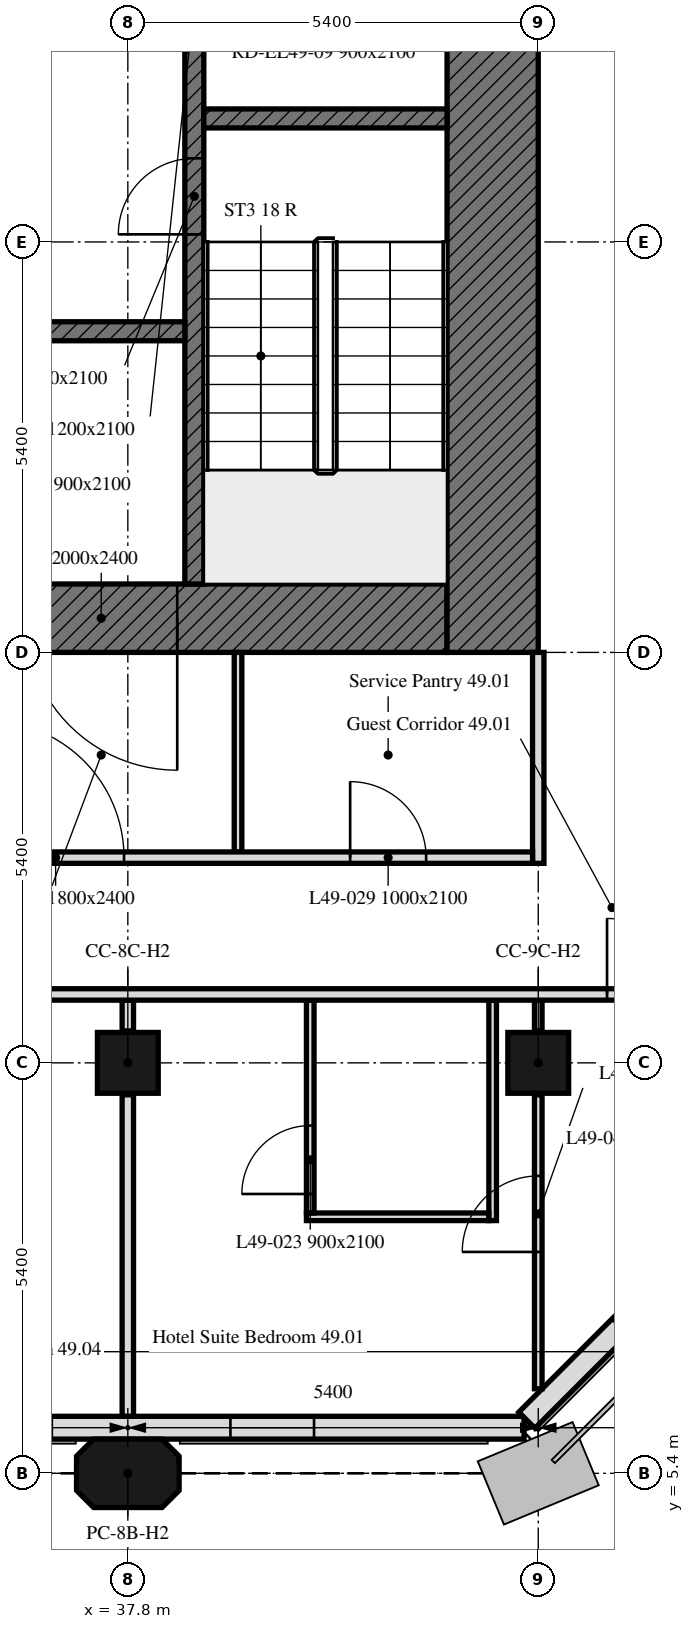
"""IFC4 building model, lengths in metres.
Left out: names, types, materials, properties, quantities, classifications, styles, units other than length and angle.
Written with IfcOpenShell. Run it as: python <this file> out.ifc"""

import sys

from ifc_helpers import new_model, si_unit, direction, frame, frame_2d, origin, origin_2d, place, context, subcontext, project, spatial, polyline, rectangle, outline, extrude, element, fill, save


model = new_model("IFC4")
c1 = context("Model", 3, precision=1e-05, world=origin(), true_north=direction((0.0, 1.0)))
c2 = subcontext(c1, "Body", "Model", "MODEL_VIEW")
j1 = project(units=[si_unit("LENGTHUNIT", "METRE"), si_unit("PLANEANGLEUNIT", "RADIAN")], contexts=[c1])
p1 = place(None, origin())
s1 = spatial("IfcSite", under=j1, at=p1, CompositionType="ELEMENT")
p2 = place(p1, origin())
s2 = spatial("IfcBuilding", under=s1, at=p2, CompositionType="ELEMENT")
p3 = place(p2, frame((0.0, 0.0, 200.5)))
s3 = spatial("IfcBuildingStorey", under=s2, at=p3, CompositionType="ELEMENT", Elevation=200.5)
p4 = place(p3, frame((37.8, 5.4, 0.0), z_axis=(0.0, 0.0, 1.0), x_axis=(1.0, 0.0, 0.0)))
e1 = element("IfcColumn", 1, at=p4, inside=s3, PredefinedType="COLUMN", context=c2, shape_type="SweptSolid", body=[
    extrude(outline(polyline([(-0.45, -0.45), (0.45, -0.45), (0.675, -0.225), (0.675, 0.225), (0.45, 0.45), (-0.45, 0.45), (-0.675, 0.225), (-0.675, -0.225), (-0.45, -0.45)])), origin(), (0.0, 0.0, 1.0), 3.0),
])
for number, where, z_axis, x_axis in (
    (2, (37.8, 10.8, 0.0), (0.0, 0.0, 1.0), (1.0, 0.0, 0.0)),
    (3, (43.2, 10.8, 0.0), (0.0, 0.0, 1.0), (1.0, 0.0, 0.0)),
):
    element("IfcColumn", number, at=place(p3, frame(where, z_axis=z_axis, x_axis=x_axis)), inside=s3, PredefinedType="COLUMN", context=c2, shape_type="SweptSolid", body=[
        extrude(rectangle(XDim=0.8, YDim=0.8, at=origin_2d()), origin(), (0.0, 0.0, 1.0), 3.0),
    ])
p5 = place(p3, frame((10.986, 6.0, 0.0), z_axis=(0.0, 0.0, 1.0), x_axis=(1.0, 0.0, 0.0)))
e4 = element("IfcWall", 4, at=p5, inside=s3, PredefinedType="SOLIDWALL", context=c2, shape_type="SweptSolid", body=[
    extrude(rectangle(XDim=32.027, YDim=0.3, at=frame_2d((16.014, 0.0))), origin(), (0.0, 0.0, 1.0), 3.0),
])
p6 = place(p5, frame((0.814, 0.0, 0.9)))
e5 = element("IfcOpeningElement", 5, at=p6, cuts=e4, PredefinedType="OPENING", context=c2, shape_type="SweptSolid", body=[
    extrude(rectangle(XDim=3.4, YDim=1.7, at=frame_2d((1.7, 0.85))), frame((0.0, 0.16, 0.0), z_axis=(0.0, -1.0, 0.0), x_axis=(1.0, 0.0, 0.0)), (0.0, 0.0, 1.0), 0.32),
])
p7 = place(p5, frame((6.564, 0.0, 0.9)))
e6 = element("IfcOpeningElement", 6, at=p7, cuts=e4, PredefinedType="OPENING", context=c2, shape_type="SweptSolid", body=[
    extrude(rectangle(XDim=1.1, YDim=1.7, at=frame_2d((0.55, 0.85))), frame((0.0, 0.16, 0.0), z_axis=(0.0, -1.0, 0.0), x_axis=(1.0, 0.0, 0.0)), (0.0, 0.0, 1.0), 0.32),
])
p8 = place(p5, frame((11.614, 0.0, 0.9)))
e7 = element("IfcOpeningElement", 7, at=p8, cuts=e4, PredefinedType="OPENING", context=c2, shape_type="SweptSolid", body=[
    extrude(rectangle(XDim=3.4, YDim=1.7, at=frame_2d((1.7, 0.85))), frame((0.0, 0.16, 0.0), z_axis=(0.0, -1.0, 0.0), x_axis=(1.0, 0.0, 0.0)), (0.0, 0.0, 1.0), 0.32),
])
p9 = place(p5, frame((17.364, 0.0, 0.9)))
e8 = element("IfcOpeningElement", 8, at=p9, cuts=e4, PredefinedType="OPENING", context=c2, shape_type="SweptSolid", body=[
    extrude(rectangle(XDim=1.1, YDim=1.7, at=frame_2d((0.55, 0.85))), frame((0.0, 0.16, 0.0), z_axis=(0.0, -1.0, 0.0), x_axis=(1.0, 0.0, 0.0)), (0.0, 0.0, 1.0), 0.32),
])
p10 = place(p5, frame((22.414, 0.0, 0.9)))
e9 = element("IfcOpeningElement", 9, at=p10, cuts=e4, PredefinedType="OPENING", context=c2, shape_type="SweptSolid", body=[
    extrude(rectangle(XDim=3.4, YDim=1.7, at=frame_2d((1.7, 0.85))), frame((0.0, 0.16, 0.0), z_axis=(0.0, -1.0, 0.0), x_axis=(1.0, 0.0, 0.0)), (0.0, 0.0, 1.0), 0.32),
])
p11 = place(p5, frame((28.164, 0.0, 0.9)))
e10 = element("IfcOpeningElement", 10, at=p11, cuts=e4, PredefinedType="OPENING", context=c2, shape_type="SweptSolid", body=[
    extrude(rectangle(XDim=1.1, YDim=1.7, at=frame_2d((0.55, 0.85))), frame((0.0, 0.16, 0.0), z_axis=(0.0, -1.0, 0.0), x_axis=(1.0, 0.0, 0.0)), (0.0, 0.0, 1.0), 0.32),
])
p12 = place(p3, frame((43.051, 6.099, 0.0), z_axis=(0.0, 0.0, 1.0), x_axis=(0.707106781187, 0.707106781187, 0.0)))
e11 = element("IfcWall", 11, at=p12, inside=s3, PredefinedType="SOLIDWALL", context=c2, shape_type="SweptSolid", body=[
    extrude(rectangle(XDim=6.86, YDim=0.3, at=frame_2d((3.43, 0.0))), origin(), (0.0, 0.0, 1.0), 3.0),
])
p13 = place(p12, frame((1.73, 0.0, 0.9)))
e12 = element("IfcOpeningElement", 12, at=p13, cuts=e11, PredefinedType="OPENING", context=c2, shape_type="SweptSolid", body=[
    extrude(rectangle(XDim=3.4, YDim=1.7, at=frame_2d((1.7, 0.85))), frame((0.0, 0.16, 0.0), z_axis=(0.0, -1.0, 0.0), x_axis=(1.0, 0.0, 0.0)), (0.0, 0.0, 1.0), 0.32),
])
p14 = place(p3, frame((42.0, 16.65, 0.0), z_axis=(0.0, 0.0, 1.0), x_axis=(-1.0, 0.0, 0.0)))
e13 = element("IfcWall", 13, at=p14, inside=s3, PredefinedType="SOLIDWALL", context=c2, shape_type="SweptSolid", body=[
    extrude(rectangle(XDim=11.1, YDim=0.9, at=frame_2d((5.55, 0.0))), origin(), (0.0, 0.0, 1.0), 3.0),
])
p15 = place(p14, frame((3.55, 0.0, 0.0)))
e14 = element("IfcOpeningElement", 14, at=p15, cuts=e13, PredefinedType="OPENING", context=c2, shape_type="SweptSolid", body=[
    extrude(rectangle(XDim=2.0, YDim=2.4, at=frame_2d((1.0, 1.2))), frame((0.0, 0.45, 0.0), z_axis=(0.0, -1.0, 0.0), x_axis=(1.0, 0.0, 0.0)), (0.0, 0.0, 1.0), 0.9),
])
p16 = place(p3, frame((42.6, 32.4, 0.0), z_axis=(0.0, 0.0, 1.0), x_axis=(0.0, -1.0, 0.0)))
e15 = element("IfcWall", 15, at=p16, inside=s3, PredefinedType="SOLIDWALL", context=c2, shape_type="SweptSolid", body=[
    extrude(rectangle(XDim=16.2, YDim=1.2, at=frame_2d((8.1, 0.0))), origin(), (0.0, 0.0, 1.0), 3.0),
])
p17 = place(p3, frame((38.675, 17.1, 0.0), z_axis=(0.0, 0.0, 1.0), x_axis=(0.0, 1.0, 0.0)))
e16 = element("IfcWall", 16, at=p17, inside=s3, PredefinedType="SOLIDWALL", context=c2, shape_type="SweptSolid", body=[
    extrude(rectangle(XDim=14.4, YDim=0.25, at=frame_2d((7.2, 0.0))), origin(), (0.0, 0.0, 1.0), 3.0),
])
p18 = place(p17, frame((4.6, 0.0, 0.0)))
e17 = element("IfcOpeningElement", 17, at=p18, cuts=e16, PredefinedType="OPENING", context=c2, shape_type="SweptSolid", body=[
    extrude(rectangle(XDim=1.0, YDim=2.1, at=frame_2d((0.5, 1.05))), frame((0.0, 0.125, 0.0), z_axis=(0.0, -1.0, 0.0), x_axis=(1.0, 0.0, 0.0)), (0.0, 0.0, 1.0), 0.25),
])
p19 = place(p17, frame((7.062, 0.0, 0.0)))
e18 = element("IfcOpeningElement", 18, at=p19, cuts=e16, PredefinedType="OPENING", context=c2, shape_type="SweptSolid", body=[
    extrude(rectangle(XDim=1.2, YDim=2.1, at=frame_2d((0.6, 1.05))), frame((0.0, 0.125, 0.0), z_axis=(0.0, -1.0, 0.0), x_axis=(1.0, 0.0, 0.0)), (0.0, 0.0, 1.0), 0.25),
])
p20 = place(p17, frame((9.472, 0.0, 0.0)))
e19 = element("IfcOpeningElement", 19, at=p20, cuts=e16, PredefinedType="OPENING", context=c2, shape_type="SweptSolid", body=[
    extrude(rectangle(XDim=0.9, YDim=2.1, at=frame_2d((0.45, 1.05))), frame((0.0, 0.125, 0.0), z_axis=(0.0, -1.0, 0.0), x_axis=(1.0, 0.0, 0.0)), (0.0, 0.0, 1.0), 0.25),
])
p21 = place(p17, frame((11.159, 0.0, 0.0)))
e20 = element("IfcOpeningElement", 20, at=p21, cuts=e16, PredefinedType="OPENING", context=c2, shape_type="SweptSolid", body=[
    extrude(rectangle(XDim=0.9, YDim=2.1, at=frame_2d((0.45, 1.05))), frame((0.0, 0.125, 0.0), z_axis=(0.0, -1.0, 0.0), x_axis=(1.0, 0.0, 0.0)), (0.0, 0.0, 1.0), 0.25),
])
p22 = place(p17, frame((13.1, 0.0, 0.0)))
e21 = element("IfcOpeningElement", 21, at=p22, cuts=e16, PredefinedType="OPENING", context=c2, shape_type="SweptSolid", body=[
    extrude(rectangle(XDim=0.9, YDim=2.1, at=frame_2d((0.45, 1.05))), frame((0.0, 0.125, 0.0), z_axis=(0.0, -1.0, 0.0), x_axis=(1.0, 0.0, 0.0)), (0.0, 0.0, 1.0), 0.25),
])
p23 = place(p3, frame((38.8, 23.225, 0.0), z_axis=(0.0, 0.0, 1.0), x_axis=(1.0, 0.0, 0.0)))
e22 = element("IfcWall", 22, at=p23, inside=s3, PredefinedType="SOLIDWALL", context=c2, shape_type="SweptSolid", body=[
    extrude(rectangle(XDim=3.2, YDim=0.25, at=frame_2d((1.6, 0.0))), origin(), (0.0, 0.0, 1.0), 3.0),
])
p24 = place(p3, frame((35.8, 20.425, 0.0), z_axis=(0.0, 0.0, 1.0), x_axis=(1.0, 0.0, 0.0)))
e23 = element("IfcWall", 23, at=p24, inside=s3, PredefinedType="SOLIDWALL", context=c2, shape_type="SweptSolid", body=[
    extrude(rectangle(XDim=2.75, YDim=0.25, at=frame_2d((1.375, 0.0))), origin(), (0.0, 0.0, 1.0), 3.0),
])
p25 = place(p3, frame((37.8, 6.151, 0.0), z_axis=(0.0, 0.0, 1.0), x_axis=(0.0, 1.0, 0.0)))
e24 = element("IfcWall", 24, at=p25, inside=s3, PredefinedType="PARTITIONING", context=c2, shape_type="SweptSolid", body=[
    extrude(rectangle(XDim=4.229, YDim=0.15, at=frame_2d((2.115, 0.0))), origin(), (0.0, 0.0, 1.0), 3.0),
])
p26 = place(p3, frame((37.8, 11.22, 0.0), z_axis=(0.0, 0.0, 1.0), x_axis=(0.0, 1.0, 0.0)))
e25 = element("IfcWall", 25, at=p26, inside=s3, PredefinedType="PARTITIONING", context=c2, shape_type="SweptSolid", body=[
    extrude(rectangle(XDim=0.405, YDim=0.15, at=frame_2d((0.203, 0.0))), origin(), (0.0, 0.0, 1.0), 3.0),
])
p27 = place(p3, frame((43.2, 6.512, 0.0), z_axis=(0.0, 0.0, 1.0), x_axis=(0.0, 1.0, 0.0)))
e26 = element("IfcWall", 26, at=p27, inside=s3, PredefinedType="PARTITIONING", context=c2, shape_type="SweptSolid", body=[
    extrude(rectangle(XDim=3.868, YDim=0.1, at=frame_2d((1.934, 0.0))), origin(), (0.0, 0.0, 1.0), 3.0),
])
p28 = place(p27, frame((1.8, 0.0, 0.0)))
e27 = element("IfcOpeningElement", 27, at=p28, cuts=e26, PredefinedType="OPENING", context=c2, shape_type="SweptSolid", body=[
    extrude(rectangle(XDim=1.0, YDim=2.1, at=frame_2d((0.5, 1.05))), frame((0.0, 0.05, 0.0), z_axis=(0.0, -1.0, 0.0), x_axis=(1.0, 0.0, 0.0)), (0.0, 0.0, 1.0), 0.1),
])
p29 = place(p3, frame((43.2, 11.22, 0.0), z_axis=(0.0, 0.0, 1.0), x_axis=(0.0, 1.0, 0.0)))
e28 = element("IfcWall", 28, at=p29, inside=s3, PredefinedType="PARTITIONING", context=c2, shape_type="SweptSolid", body=[
    extrude(rectangle(XDim=0.405, YDim=0.1, at=frame_2d((0.203, 0.0))), origin(), (0.0, 0.0, 1.0), 3.0),
])
p30 = place(p3, frame((42.6, 11.625, 0.0), z_axis=(0.0, 0.0, 1.0), x_axis=(0.0, -1.0, 0.0)))
e29 = element("IfcWall", 29, at=p30, inside=s3, PredefinedType="PARTITIONING", context=c2, shape_type="SweptSolid", body=[
    extrude(rectangle(XDim=2.9, YDim=0.1, at=frame_2d((1.45, 0.0))), origin(), (0.0, 0.0, 1.0), 3.0),
])
p31 = place(p3, frame((42.55, 8.775, 0.0), z_axis=(0.0, 0.0, 1.0), x_axis=(-1.0, 0.0, 0.0)))
e30 = element("IfcWall", 30, at=p31, inside=s3, PredefinedType="PARTITIONING", context=c2, shape_type="SweptSolid", body=[
    extrude(rectangle(XDim=2.4, YDim=0.1, at=frame_2d((1.2, 0.0))), origin(), (0.0, 0.0, 1.0), 3.0),
])
p32 = place(p3, frame((40.2, 8.825, 0.0), z_axis=(0.0, 0.0, 1.0), x_axis=(0.0, 1.0, 0.0)))
e31 = element("IfcWall", 31, at=p32, inside=s3, PredefinedType="PARTITIONING", context=c2, shape_type="SweptSolid", body=[
    extrude(rectangle(XDim=2.8, YDim=0.1, at=frame_2d((1.4, 0.0))), origin(), (0.0, 0.0, 1.0), 3.0),
])
p33 = place(p32, frame((0.25, 0.0, 0.0)))
e32 = element("IfcOpeningElement", 32, at=p33, cuts=e31, PredefinedType="OPENING", context=c2, shape_type="SweptSolid", body=[
    extrude(rectangle(XDim=0.9, YDim=2.1, at=frame_2d((0.45, 1.05))), frame((0.0, 0.05, 0.0), z_axis=(0.0, -1.0, 0.0), x_axis=(1.0, 0.0, 0.0)), (0.0, 0.0, 1.0), 0.1),
])
p34 = place(p3, frame((6.151, 11.7, 0.0), z_axis=(0.0, 0.0, 1.0), x_axis=(1.0, 0.0, 0.0)))
e33 = element("IfcWall", 33, at=p34, inside=s3, PredefinedType="PARTITIONING", context=c2, shape_type="SweptSolid", body=[
    extrude(rectangle(XDim=41.698, YDim=0.15, at=frame_2d((20.849, 0.0))), origin(), (0.0, 0.0, 1.0), 3.0),
])
p35 = place(p34, frame((37.954, 0.0, 0.0)))
e34 = element("IfcOpeningElement", 34, at=p35, cuts=e33, PredefinedType="OPENING", context=c2, shape_type="SweptSolid", body=[
    extrude(rectangle(XDim=1.0, YDim=2.1, at=frame_2d((0.5, 1.05))), frame((0.0, 0.075, 0.0), z_axis=(0.0, -1.0, 0.0), x_axis=(1.0, 0.0, 0.0)), (0.0, 0.0, 1.0), 0.15),
])
p36 = place(p34, frame((6.849, 0.0, 0.0)))
e35 = element("IfcOpeningElement", 35, at=p36, cuts=e33, PredefinedType="OPENING", context=c2, shape_type="SweptSolid", body=[
    extrude(rectangle(XDim=1.0, YDim=2.1, at=frame_2d((0.5, 1.05))), frame((0.0, 0.075, 0.0), z_axis=(0.0, -1.0, 0.0), x_axis=(1.0, 0.0, 0.0)), (0.0, 0.0, 1.0), 0.15),
])
p37 = place(p34, frame((23.049, 0.0, 0.0)))
e36 = element("IfcOpeningElement", 36, at=p37, cuts=e33, PredefinedType="OPENING", context=c2, shape_type="SweptSolid", body=[
    extrude(rectangle(XDim=1.0, YDim=2.1, at=frame_2d((0.5, 1.05))), frame((0.0, 0.075, 0.0), z_axis=(0.0, -1.0, 0.0), x_axis=(1.0, 0.0, 0.0)), (0.0, 0.0, 1.0), 0.15),
])
p38 = place(p3, frame((39.25, 13.575, 0.0), z_axis=(0.0, 0.0, 1.0), x_axis=(0.0, 1.0, 0.0)))
e37 = element("IfcWall", 37, at=p38, inside=s3, PredefinedType="PARTITIONING", context=c2, shape_type="SweptSolid", body=[
    extrude(rectangle(XDim=2.625, YDim=0.1, at=frame_2d((1.312, 0.0))), origin(), (0.0, 0.0, 1.0), 3.0),
])
p39 = place(p3, frame((43.2, 16.2, 0.0), z_axis=(0.0, 0.0, 1.0), x_axis=(0.0, -1.0, 0.0)))
e38 = element("IfcWall", 38, at=p39, inside=s3, PredefinedType="PARTITIONING", context=c2, shape_type="SweptSolid", body=[
    extrude(rectangle(XDim=2.775, YDim=0.15, at=frame_2d((1.387, 0.0))), origin(), (0.0, 0.0, 1.0), 3.0),
])
p40 = place(p3, frame((6.151, 13.5, 0.0), z_axis=(0.0, 0.0, 1.0), x_axis=(1.0, 0.0, 0.0)))
e39 = element("IfcWall", 39, at=p40, inside=s3, PredefinedType="PARTITIONING", context=c2, shape_type="SweptSolid", body=[
    extrude(rectangle(XDim=36.974, YDim=0.15, at=frame_2d((18.487, 0.0))), origin(), (0.0, 0.0, 1.0), 3.0),
])
p41 = place(p40, frame((12.249, 0.0, 0.0)))
e40 = element("IfcOpeningElement", 40, at=p41, cuts=e39, PredefinedType="OPENING", context=c2, shape_type="SweptSolid", body=[
    extrude(rectangle(XDim=1.0, YDim=2.1, at=frame_2d((0.5, 1.05))), frame((0.0, 0.075, 0.0), z_axis=(0.0, -1.0, 0.0), x_axis=(1.0, 0.0, 0.0)), (0.0, 0.0, 1.0), 0.15),
])
p42 = place(p40, frame((18.816, 0.0, 0.0)))
e41 = element("IfcOpeningElement", 41, at=p42, cuts=e39, PredefinedType="OPENING", context=c2, shape_type="SweptSolid", body=[
    extrude(rectangle(XDim=1.0, YDim=2.1, at=frame_2d((0.5, 1.05))), frame((0.0, 0.075, 0.0), z_axis=(0.0, -1.0, 0.0), x_axis=(1.0, 0.0, 0.0)), (0.0, 0.0, 1.0), 0.15),
])
p43 = place(p40, frame((2.029, 0.0, 0.0)))
e42 = element("IfcOpeningElement", 42, at=p43, cuts=e39, PredefinedType="OPENING", context=c2, shape_type="SweptSolid", body=[
    extrude(rectangle(XDim=1.0, YDim=2.1, at=frame_2d((0.5, 1.05))), frame((0.0, 0.075, 0.0), z_axis=(0.0, -1.0, 0.0), x_axis=(1.0, 0.0, 0.0)), (0.0, 0.0, 1.0), 0.15),
])
p44 = place(p40, frame((27.374, 0.0, 0.0)))
e43 = element("IfcOpeningElement", 43, at=p44, cuts=e39, PredefinedType="OPENING", context=c2, shape_type="SweptSolid", body=[
    extrude(rectangle(XDim=1.0, YDim=2.1, at=frame_2d((0.5, 1.05))), frame((0.0, 0.075, 0.0), z_axis=(0.0, -1.0, 0.0), x_axis=(1.0, 0.0, 0.0)), (0.0, 0.0, 1.0), 0.15),
])
p45 = place(p40, frame((34.574, 0.0, 0.0)))
e44 = element("IfcOpeningElement", 44, at=p45, cuts=e39, PredefinedType="OPENING", context=c2, shape_type="SweptSolid", body=[
    extrude(rectangle(XDim=1.0, YDim=2.1, at=frame_2d((0.5, 1.05))), frame((0.0, 0.075, 0.0), z_axis=(0.0, -1.0, 0.0), x_axis=(1.0, 0.0, 0.0)), (0.0, 0.0, 1.0), 0.15),
])
p46 = place(p40, frame((7.924, 0.0, 0.0)))
e45 = element("IfcOpeningElement", 45, at=p46, cuts=e39, PredefinedType="OPENING", context=c2, shape_type="SweptSolid", body=[
    extrude(rectangle(XDim=1.0, YDim=2.1, at=frame_2d((0.5, 1.05))), frame((0.0, 0.075, 0.0), z_axis=(0.0, -1.0, 0.0), x_axis=(1.0, 0.0, 0.0)), (0.0, 0.0, 1.0), 0.15),
])
p47 = place(p40, frame((4.699, 0.0, 0.0)))
e46 = element("IfcOpeningElement", 46, at=p47, cuts=e39, PredefinedType="OPENING", context=c2, shape_type="SweptSolid", body=[
    extrude(rectangle(XDim=1.8, YDim=2.4, at=frame_2d((0.9, 1.2))), frame((0.0, 0.075, 0.0), z_axis=(0.0, -1.0, 0.0), x_axis=(1.0, 0.0, 0.0)), (0.0, 0.0, 1.0), 0.15),
])
p48 = place(p40, frame((29.799, 0.0, 0.0)))
e47 = element("IfcOpeningElement", 47, at=p48, cuts=e39, PredefinedType="OPENING", context=c2, shape_type="SweptSolid", body=[
    extrude(rectangle(XDim=1.8, YDim=2.4, at=frame_2d((0.9, 1.2))), frame((0.0, 0.075, 0.0), z_axis=(0.0, -1.0, 0.0), x_axis=(1.0, 0.0, 0.0)), (0.0, 0.0, 1.0), 0.15),
])
p49 = place(p11, origin())
e48 = element("IfcWindow", 48, at=p49, inside=s3, PartitioningType="SINGLE_PANEL", PredefinedType="WINDOW", context=c2, shape_type="SweptSolid", body=[
    extrude(rectangle(XDim=1.1, YDim=1.7, at=frame_2d((0.55, 0.85))), frame((0.0, 0.03, 0.0), z_axis=(0.0, -1.0, 0.0), x_axis=(1.0, 0.0, 0.0)), (0.0, 0.0, 1.0), 0.06),
])
fill(e10, e48)
p50 = place(p15, origin())
e49 = element("IfcDoor", 49, at=p50, inside=s3, OperationType="DOUBLE_DOOR_SINGLE_SWING", PredefinedType="DOOR", context=c2, shape_type="SweptSolid", body=[
    extrude(rectangle(XDim=2.0, YDim=2.4, at=frame_2d((1.0, 1.2))), frame((0.0, 0.025, 0.0), z_axis=(0.0, -1.0, 0.0), x_axis=(1.0, 0.0, 0.0)), (0.0, 0.0, 1.0), 0.05),
])
fill(e14, e49)
p51 = place(p18, origin())
e50 = element("IfcDoor", 50, at=p51, inside=s3, OperationType="SINGLE_SWING_LEFT", PredefinedType="DOOR", context=c2, shape_type="SweptSolid", body=[
    extrude(rectangle(XDim=1.0, YDim=2.1, at=frame_2d((0.5, 1.05))), frame((0.0, 0.025, 0.0), z_axis=(0.0, -1.0, 0.0), x_axis=(1.0, 0.0, 0.0)), (0.0, 0.0, 1.0), 0.05),
])
fill(e17, e50)
p52 = place(p33, origin())
e51 = element("IfcDoor", 51, at=p52, inside=s3, OperationType="SINGLE_SWING_RIGHT", PredefinedType="DOOR", context=c2, shape_type="SweptSolid", body=[
    extrude(rectangle(XDim=0.9, YDim=2.1, at=frame_2d((0.45, 1.05))), frame((0.0, 0.025, 0.0), z_axis=(0.0, -1.0, 0.0), x_axis=(1.0, 0.0, 0.0)), (0.0, 0.0, 1.0), 0.05),
])
fill(e32, e51)
p53 = place(p45, origin())
e52 = element("IfcDoor", 52, at=p53, inside=s3, OperationType="SINGLE_SWING_RIGHT", PredefinedType="DOOR", context=c2, shape_type="SweptSolid", body=[
    extrude(rectangle(XDim=1.0, YDim=2.1, at=frame_2d((0.5, 1.05))), frame((0.0, 0.025, 0.0), z_axis=(0.0, -1.0, 0.0), x_axis=(1.0, 0.0, 0.0)), (0.0, 0.0, 1.0), 0.05),
])
fill(e44, e52)
p54 = place(p28, origin())
e53 = element("IfcDoor", 53, at=p54, inside=s3, OperationType="SINGLE_SWING_RIGHT", PredefinedType="DOOR", context=c2, shape_type="SweptSolid", body=[
    extrude(rectangle(XDim=1.0, YDim=2.1, at=frame_2d((0.5, 1.05))), frame((0.0, 0.025, 0.0), z_axis=(0.0, -1.0, 0.0), x_axis=(1.0, 0.0, 0.0)), (0.0, 0.0, 1.0), 0.05),
])
fill(e27, e53)
p55 = place(p35, origin())
e54 = element("IfcDoor", 54, at=p55, inside=s3, OperationType="SINGLE_SWING_LEFT", PredefinedType="DOOR", context=c2, shape_type="SweptSolid", body=[
    extrude(rectangle(XDim=1.0, YDim=2.1, at=frame_2d((0.5, 1.05))), frame((0.0, 0.025, 0.0), z_axis=(0.0, -1.0, 0.0), x_axis=(1.0, 0.0, 0.0)), (0.0, 0.0, 1.0), 0.05),
])
fill(e34, e54)
p56 = place(p48, origin())
e55 = element("IfcDoor", 55, at=p56, inside=s3, OperationType="DOUBLE_DOOR_SINGLE_SWING", PredefinedType="DOOR", context=c2, shape_type="SweptSolid", body=[
    extrude(rectangle(XDim=1.8, YDim=2.4, at=frame_2d((0.9, 1.2))), frame((0.0, 0.025, 0.0), z_axis=(0.0, -1.0, 0.0), x_axis=(1.0, 0.0, 0.0)), (0.0, 0.0, 1.0), 0.05),
])
fill(e47, e55)
save(model, sys.argv[1])
